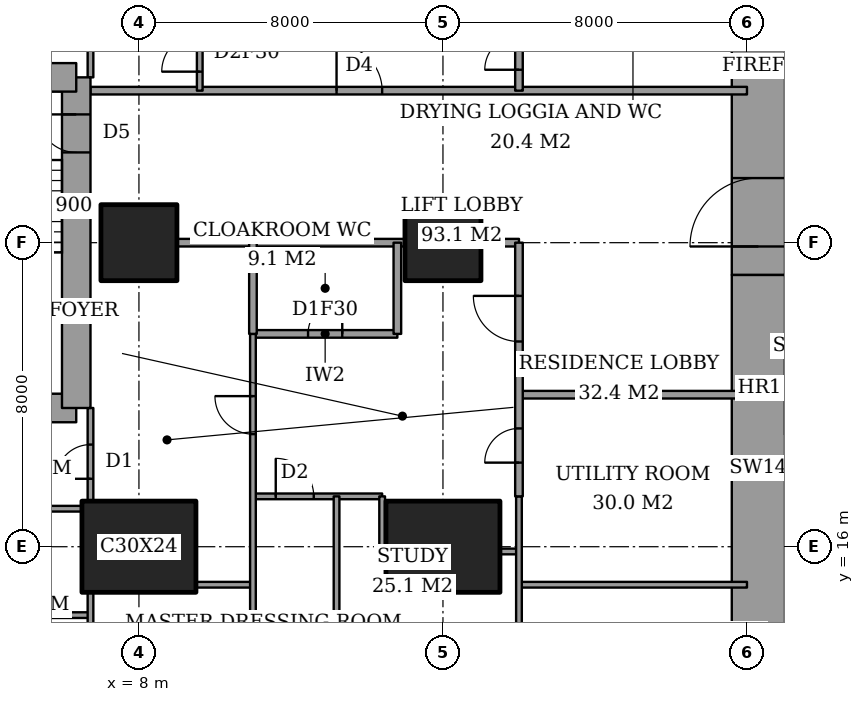
"""IFC4 building model, lengths in metres.
Left out: names, types, materials, properties, quantities, classifications, styles, units other than length and angle.
Written with IfcOpenShell. Run it as: python <this file> out.ifc"""

import sys

from ifc_helpers import new_model, si_unit, direction, frame, frame_2d, origin, origin_2d, place, context, subcontext, project, spatial, rectangle, extrude, element, fill, save


model = new_model("IFC4")
c1 = context("Model", 3, precision=1e-05, world=origin(), true_north=direction((0.0, 1.0)))
c2 = subcontext(c1, "Body", "Model", "MODEL_VIEW")
j1 = project(units=[si_unit("LENGTHUNIT", "METRE"), si_unit("PLANEANGLEUNIT", "RADIAN")], contexts=[c1])
p1 = place(None, origin())
s1 = spatial("IfcSite", under=j1, at=p1, CompositionType="ELEMENT")
p2 = place(p1, origin())
s2 = spatial("IfcBuilding", under=s1, at=p2, CompositionType="ELEMENT")
p3 = place(p2, frame((0.0, 0.0, 76.4)))
s3 = spatial("IfcBuildingStorey", under=s2, at=p3, CompositionType="ELEMENT", Elevation=76.4)
p4 = place(p3, frame((8.0, 16.0, 0.0), z_axis=(0.0, 0.0, 1.0), x_axis=(1.0, 0.0, 0.0)))
e1 = element("IfcColumn", 1, at=p4, inside=s3, PredefinedType="COLUMN", context=c2, shape_type="SweptSolid", body=[
    extrude(rectangle(XDim=3.0, YDim=2.4, at=origin_2d()), origin(), (0.0, 0.0, 1.0), 3.6),
])
p5 = place(p3, frame((8.0, 24.0, 0.0), z_axis=(0.0, 0.0, 1.0), x_axis=(1.0, 0.0, 0.0)))
e2 = element("IfcColumn", 2, at=p5, inside=s3, PredefinedType="COLUMN", context=c2, shape_type="SweptSolid", body=[
    extrude(rectangle(XDim=2.0, YDim=2.0, at=origin_2d()), origin(), (0.0, 0.0, 1.0), 3.6),
])
p6 = place(p3, frame((16.0, 16.0, 0.0), z_axis=(0.0, 0.0, 1.0), x_axis=(1.0, 0.0, 0.0)))
e3 = element("IfcColumn", 3, at=p6, inside=s3, PredefinedType="COLUMN", context=c2, shape_type="SweptSolid", body=[
    extrude(rectangle(XDim=3.0, YDim=2.4, at=origin_2d()), origin(), (0.0, 0.0, 1.0), 3.6),
])
p7 = place(p3, frame((16.0, 24.0, 0.0), z_axis=(0.0, 0.0, 1.0), x_axis=(1.0, 0.0, 0.0)))
e4 = element("IfcColumn", 4, at=p7, inside=s3, PredefinedType="COLUMN", context=c2, shape_type="SweptSolid", body=[
    extrude(rectangle(XDim=2.0, YDim=2.0, at=origin_2d()), origin(), (0.0, 0.0, 1.0), 3.6),
])
p8 = place(p3, frame((24.3, 13.0, 0.0), z_axis=(0.0, 0.0, 1.0), x_axis=(0.0, 1.0, 0.0)))
e5 = element("IfcWall", 5, at=p8, inside=s3, PredefinedType="SHEAR", context=c2, shape_type="SweptSolid", body=[
    extrude(rectangle(XDim=10.15, YDim=1.4, at=frame_2d((5.075, 0.0))), origin(), (0.0, 0.0, 1.0), 3.6),
])
p9 = place(p3, frame((24.3, 23.15, 0.0), z_axis=(0.0, 0.0, 1.0), x_axis=(0.0, 1.0, 0.0)))
e6 = element("IfcWall", 6, at=p9, inside=s3, PredefinedType="SHEAR", context=c2, shape_type="SweptSolid", body=[
    extrude(rectangle(XDim=11.85, YDim=1.4, at=frame_2d((5.925, 0.0))), origin(), (0.0, 0.0, 1.0), 3.6),
])
p10 = place(p9, frame((0.75, 0.0, 0.0)))
e7 = element("IfcOpeningElement", 7, at=p10, cuts=e6, PredefinedType="OPENING", context=c2, shape_type="SweptSolid", body=[
    extrude(rectangle(XDim=1.8, YDim=2.4, at=frame_2d((0.9, 1.2))), frame((0.0, 0.71, 0.0), z_axis=(0.0, -1.0, 0.0), x_axis=(1.0, 0.0, 0.0)), (0.0, 0.0, 1.0), 1.42),
])
p11 = place(p3, frame((1.9, 19.65, 0.0), z_axis=(0.0, 0.0, 1.0), x_axis=(1.0, 0.0, 0.0)))
e8 = element("IfcWall", 8, at=p11, inside=s3, PredefinedType="SHEAR", context=c2, shape_type="SweptSolid", body=[
    extrude(rectangle(XDim=4.45, YDim=0.75, at=frame_2d((2.225, 0.0))), origin(), (0.0, 0.0, 1.0), 3.6),
])
p12 = place(p3, frame((6.35, 19.65, 0.0), z_axis=(0.0, 0.0, 1.0), x_axis=(0.0, 1.0, 0.0)))
e9 = element("IfcWall", 9, at=p12, inside=s3, PredefinedType="SHEAR", context=c2, shape_type="SweptSolid", body=[
    extrude(rectangle(XDim=8.7, YDim=0.75, at=frame_2d((4.35, 0.0))), origin(), (0.0, 0.0, 1.0), 3.6),
])
p13 = place(p12, frame((6.725, 0.0, 0.0)))
e10 = element("IfcOpeningElement", 10, at=p13, cuts=e9, PredefinedType="OPENING", context=c2, shape_type="SweptSolid", body=[
    extrude(rectangle(XDim=1.0, YDim=2.1, at=frame_2d((0.5, 1.05))), frame((0.0, 0.385, 0.0), z_axis=(0.0, -1.0, 0.0), x_axis=(1.0, 0.0, 0.0)), (0.0, 0.0, 1.0), 0.77),
])
p14 = place(p3, frame((6.35, 28.35, 0.0), z_axis=(0.0, 0.0, 1.0), x_axis=(-1.0, 0.0, 0.0)))
e11 = element("IfcWall", 11, at=p14, inside=s3, PredefinedType="SHEAR", context=c2, shape_type="SweptSolid", body=[
    extrude(rectangle(XDim=4.45, YDim=0.75, at=frame_2d((2.225, 0.0))), origin(), (0.0, 0.0, 1.0), 3.6),
])
p15 = place(p3, frame((4.125, 14.2, 0.0), z_axis=(0.0, 0.0, 1.0), x_axis=(1.0, 0.0, 0.0)))
e12 = element("IfcWall", 12, at=p15, inside=s3, PredefinedType="PARTITIONING", context=c2, shape_type="SweptSolid", body=[
    extrude(rectangle(XDim=2.6, YDim=0.15, at=frame_2d((1.3, 0.0))), origin(), (0.0, 0.0, 1.0), 3.35),
])
p16 = place(p3, frame((9.5, 15.0, 0.0), z_axis=(0.0, 0.0, 1.0), x_axis=(1.0, 0.0, 0.0)))
e13 = element("IfcWall", 13, at=p16, inside=s3, PredefinedType="PARTITIONING", context=c2, shape_type="SweptSolid", body=[
    extrude(rectangle(XDim=1.5, YDim=0.15, at=frame_2d((0.75, 0.0))), origin(), (0.0, 0.0, 1.0), 3.35),
])
p17 = place(p3, frame((18.0, 15.0, 0.0), z_axis=(0.0, 0.0, 1.0), x_axis=(1.0, 0.0, 0.0)))
e14 = element("IfcWall", 14, at=p17, inside=s3, PredefinedType="PARTITIONING", context=c2, shape_type="SweptSolid", body=[
    extrude(rectangle(XDim=6.0, YDim=0.15, at=frame_2d((3.0, 0.0))), origin(), (0.0, 0.0, 1.0), 3.35),
])
p18 = place(p3, frame((17.5, 15.875, 0.0), z_axis=(0.0, 0.0, 1.0), x_axis=(1.0, 0.0, 0.0)))
e15 = element("IfcWall", 15, at=p18, inside=s3, PredefinedType="PARTITIONING", context=c2, shape_type="SweptSolid", body=[
    extrude(rectangle(XDim=0.5, YDim=0.15, at=frame_2d((0.25, 0.0))), origin(), (0.0, 0.0, 1.0), 2.634),
])
p19 = place(p3, frame((1.35, 17.0, 0.0), z_axis=(0.0, 0.0, 1.0), x_axis=(1.0, 0.0, 0.0)))
e16 = element("IfcWall", 16, at=p19, inside=s3, PredefinedType="PARTITIONING", context=c2, shape_type="SweptSolid", body=[
    extrude(rectangle(XDim=5.15, YDim=0.15, at=frame_2d((2.575, 0.0))), origin(), (0.0, 0.0, 1.0), 3.35),
])
p20 = place(p3, frame((11.0, 17.325, 0.0), z_axis=(0.0, 0.0, 1.0), x_axis=(1.0, 0.0, 0.0)))
e17 = element("IfcWall", 17, at=p20, inside=s3, PredefinedType="PARTITIONING", context=c2, shape_type="SweptSolid", body=[
    extrude(rectangle(XDim=3.4, YDim=0.15, at=frame_2d((1.7, 0.0))), origin(), (0.0, 0.0, 1.0), 3.35),
])
p21 = place(p20, frame((0.6, 0.0, 0.0)))
e18 = element("IfcOpeningElement", 18, at=p21, cuts=e17, PredefinedType="OPENING", context=c2, shape_type="SweptSolid", body=[
    extrude(rectangle(XDim=1.0, YDim=2.1, at=frame_2d((0.5, 1.05))), frame((0.0, 0.085, 0.0), z_axis=(0.0, -1.0, 0.0), x_axis=(1.0, 0.0, 0.0)), (0.0, 0.0, 1.0), 0.17),
])
p22 = place(p3, frame((18.0, 20.0, 0.0), z_axis=(0.0, 0.0, 1.0), x_axis=(1.0, 0.0, 0.0)))
e19 = element("IfcWall", 19, at=p22, inside=s3, PredefinedType="PARTITIONING", context=c2, shape_type="SweptSolid", body=[
    extrude(rectangle(XDim=6.0, YDim=0.2, at=frame_2d((3.0, 0.0))), origin(), (0.0, 0.0, 1.0), 3.35),
])
p23 = place(p3, frame((11.0, 21.6, 0.0), z_axis=(0.0, 0.0, 1.0), x_axis=(1.0, 0.0, 0.0)))
e20 = element("IfcWall", 20, at=p23, inside=s3, PredefinedType="PARTITIONING", context=c2, shape_type="SweptSolid", body=[
    extrude(rectangle(XDim=3.8, YDim=0.2, at=frame_2d((1.9, 0.0))), origin(), (0.0, 0.0, 1.0), 3.35),
])
p24 = place(p23, frame((1.45, 0.0, 0.0)))
e21 = element("IfcOpeningElement", 21, at=p24, cuts=e20, PredefinedType="OPENING", context=c2, shape_type="SweptSolid", body=[
    extrude(rectangle(XDim=0.9, YDim=2.1, at=frame_2d((0.45, 1.05))), frame((0.0, 0.11, 0.0), z_axis=(0.0, -1.0, 0.0), x_axis=(1.0, 0.0, 0.0)), (0.0, 0.0, 1.0), 0.22),
])
p25 = place(p3, frame((9.0, 24.0, 0.0), z_axis=(0.0, 0.0, 1.0), x_axis=(1.0, 0.0, 0.0)))
e22 = element("IfcWall", 22, at=p25, inside=s3, PredefinedType="PARTITIONING", context=c2, shape_type="SweptSolid", body=[
    extrude(rectangle(XDim=6.0, YDim=0.2, at=frame_2d((3.0, 0.0))), origin(), (0.0, 0.0, 1.0), 3.35),
])
p26 = place(p3, frame((17.0, 24.0, 0.0), z_axis=(0.0, 0.0, 1.0), x_axis=(1.0, 0.0, 0.0)))
e23 = element("IfcWall", 23, at=p26, inside=s3, PredefinedType="PARTITIONING", context=c2, shape_type="SweptSolid", body=[
    extrude(rectangle(XDim=1.0, YDim=0.2, at=frame_2d((0.5, 0.0))), origin(), (0.0, 0.0, 1.0), 3.35),
])
p27 = place(p3, frame((6.725, 28.0, 0.0), z_axis=(0.0, 0.0, 1.0), x_axis=(1.0, 0.0, 0.0)))
e24 = element("IfcWall", 24, at=p27, inside=s3, PredefinedType="PARTITIONING", context=c2, shape_type="SweptSolid", body=[
    extrude(rectangle(XDim=17.275, YDim=0.2, at=frame_2d((8.637, 0.0))), origin(), (0.0, 0.0, 1.0), 3.35),
])
p28 = place(p27, frame((6.475, 0.0, 0.0)))
e25 = element("IfcOpeningElement", 25, at=p28, cuts=e24, PredefinedType="OPENING", context=c2, shape_type="SweptSolid", body=[
    extrude(rectangle(XDim=1.2, YDim=2.4, at=frame_2d((0.6, 1.2))), frame((0.0, 0.11, 0.0), z_axis=(0.0, -1.0, 0.0), x_axis=(1.0, 0.0, 0.0)), (0.0, 0.0, 1.0), 0.22),
])
p29 = place(p3, frame((6.725, 11.0, 0.0), z_axis=(0.0, 0.0, 1.0), x_axis=(0.0, 1.0, 0.0)))
e26 = element("IfcWall", 26, at=p29, inside=s3, PredefinedType="PARTITIONING", context=c2, shape_type="SweptSolid", body=[
    extrude(rectangle(XDim=3.8, YDim=0.15, at=frame_2d((1.9, 0.0))), origin(), (0.0, 0.0, 1.0), 3.35),
])
p30 = place(p29, frame((1.15, 0.0, 0.0)))
e27 = element("IfcOpeningElement", 27, at=p30, cuts=e26, PredefinedType="OPENING", context=c2, shape_type="SweptSolid", body=[
    extrude(rectangle(XDim=0.9, YDim=2.1, at=frame_2d((0.45, 1.05))), frame((0.0, 0.085, 0.0), z_axis=(0.0, -1.0, 0.0), x_axis=(1.0, 0.0, 0.0)), (0.0, 0.0, 1.0), 0.17),
])
p31 = place(p3, frame((6.725, 17.2, 0.0), z_axis=(0.0, 0.0, 1.0), x_axis=(0.0, 1.0, 0.0)))
e28 = element("IfcWall", 28, at=p31, inside=s3, PredefinedType="PARTITIONING", context=c2, shape_type="SweptSolid", body=[
    extrude(rectangle(XDim=2.45, YDim=0.15, at=frame_2d((1.225, 0.0))), origin(), (0.0, 0.0, 1.0), 3.35),
])
p32 = place(p31, frame((0.587, 0.0, 0.0)))
e29 = element("IfcOpeningElement", 29, at=p32, cuts=e28, PredefinedType="OPENING", context=c2, shape_type="SweptSolid", body=[
    extrude(rectangle(XDim=0.9, YDim=2.1, at=frame_2d((0.45, 1.05))), frame((0.0, 0.085, 0.0), z_axis=(0.0, -1.0, 0.0), x_axis=(1.0, 0.0, 0.0)), (0.0, 0.0, 1.0), 0.17),
])
p33 = place(p3, frame((6.725, 28.35, 0.0), z_axis=(0.0, 0.0, 1.0), x_axis=(0.0, 1.0, 0.0)))
e30 = element("IfcWall", 30, at=p33, inside=s3, PredefinedType="PARTITIONING", context=c2, shape_type="SweptSolid", body=[
    extrude(rectangle(XDim=2.45, YDim=0.15, at=frame_2d((1.225, 0.0))), origin(), (0.0, 0.0, 1.0), 3.35),
])
p34 = place(p33, frame((0.913, 0.0, 0.0)))
e31 = element("IfcOpeningElement", 31, at=p34, cuts=e30, PredefinedType="OPENING", context=c2, shape_type="SweptSolid", body=[
    extrude(rectangle(XDim=1.0, YDim=2.1, at=frame_2d((0.5, 1.05))), frame((0.0, 0.085, 0.0), z_axis=(0.0, -1.0, 0.0), x_axis=(1.0, 0.0, 0.0)), (0.0, 0.0, 1.0), 0.17),
])
p35 = place(p3, frame((9.6, 28.0, 0.0), z_axis=(0.0, 0.0, 1.0), x_axis=(0.0, 1.0, 0.0)))
e32 = element("IfcWall", 32, at=p35, inside=s3, PredefinedType="PARTITIONING", context=c2, shape_type="SweptSolid", body=[
    extrude(rectangle(XDim=9.4, YDim=0.15, at=frame_2d((4.7, 0.0))), origin(), (0.0, 0.0, 1.0), 3.35),
])
p36 = place(p35, frame((0.5, 0.0, 0.0)))
e33 = element("IfcOpeningElement", 33, at=p36, cuts=e32, PredefinedType="OPENING", context=c2, shape_type="SweptSolid", body=[
    extrude(rectangle(XDim=1.0, YDim=2.1, at=frame_2d((0.5, 1.05))), frame((0.0, 0.085, 0.0), z_axis=(0.0, -1.0, 0.0), x_axis=(1.0, 0.0, 0.0)), (0.0, 0.0, 1.0), 0.17),
])
p37 = place(p3, frame((11.0, 21.6, 0.0), z_axis=(0.0, 0.0, 1.0), x_axis=(0.0, 1.0, 0.0)))
e34 = element("IfcWall", 34, at=p37, inside=s3, PredefinedType="PARTITIONING", context=c2, shape_type="SweptSolid", body=[
    extrude(rectangle(XDim=2.4, YDim=0.2, at=frame_2d((1.2, 0.0))), origin(), (0.0, 0.0, 1.0), 3.35),
])
p38 = place(p3, frame((11.0, 11.0, 0.0), z_axis=(0.0, 0.0, 1.0), x_axis=(0.0, 1.0, 0.0)))
e35 = element("IfcWall", 35, at=p38, inside=s3, PredefinedType="PARTITIONING", context=c2, shape_type="SweptSolid", body=[
    extrude(rectangle(XDim=10.6, YDim=0.15, at=frame_2d((5.3, 0.0))), origin(), (0.0, 0.0, 1.0), 3.35),
])
p39 = place(p38, frame((7.962, 0.0, 0.0)))
e36 = element("IfcOpeningElement", 36, at=p39, cuts=e35, PredefinedType="OPENING", context=c2, shape_type="SweptSolid", body=[
    extrude(rectangle(XDim=1.0, YDim=2.1, at=frame_2d((0.5, 1.05))), frame((0.0, 0.085, 0.0), z_axis=(0.0, -1.0, 0.0), x_axis=(1.0, 0.0, 0.0)), (0.0, 0.0, 1.0), 0.17),
])
p40 = place(p3, frame((13.2, 11.0, 0.0), z_axis=(0.0, 0.0, 1.0), x_axis=(0.0, 1.0, 0.0)))
e37 = element("IfcWall", 37, at=p40, inside=s3, PredefinedType="PARTITIONING", context=c2, shape_type="SweptSolid", body=[
    extrude(rectangle(XDim=6.325, YDim=0.15, at=frame_2d((3.163, 0.0))), origin(), (0.0, 0.0, 1.0), 3.35),
])
p41 = place(p3, frame((14.4, 15.875, 0.0), z_axis=(0.0, 0.0, 1.0), x_axis=(0.0, 1.0, 0.0)))
e38 = element("IfcWall", 38, at=p41, inside=s3, PredefinedType="PARTITIONING", context=c2, shape_type="SweptSolid", body=[
    extrude(rectangle(XDim=1.45, YDim=0.15, at=frame_2d((0.725, 0.0))), origin(), (0.0, 0.0, 1.0), 3.35),
])
p42 = place(p3, frame((14.8, 21.6, 0.0), z_axis=(0.0, 0.0, 1.0), x_axis=(0.0, 1.0, 0.0)))
e39 = element("IfcWall", 39, at=p42, inside=s3, PredefinedType="PARTITIONING", context=c2, shape_type="SweptSolid", body=[
    extrude(rectangle(XDim=2.4, YDim=0.2, at=frame_2d((1.2, 0.0))), origin(), (0.0, 0.0, 1.0), 3.35),
])
p43 = place(p3, frame((18.0, 17.325, 0.0), z_axis=(0.0, 0.0, 1.0), x_axis=(0.0, 1.0, 0.0)))
e40 = element("IfcWall", 40, at=p43, inside=s3, PredefinedType="PARTITIONING", context=c2, shape_type="SweptSolid", body=[
    extrude(rectangle(XDim=6.675, YDim=0.2, at=frame_2d((3.337, 0.0))), origin(), (0.0, 0.0, 1.0), 3.35),
])
p44 = place(p43, frame((4.075, 0.0, 0.0)))
e41 = element("IfcOpeningElement", 41, at=p44, cuts=e40, PredefinedType="OPENING", context=c2, shape_type="SweptSolid", body=[
    extrude(rectangle(XDim=1.2, YDim=2.4, at=frame_2d((0.6, 1.2))), frame((0.0, 0.11, 0.0), z_axis=(0.0, -1.0, 0.0), x_axis=(1.0, 0.0, 0.0)), (0.0, 0.0, 1.0), 0.22),
])
p45 = place(p43, frame((0.887, 0.0, 0.0)))
e42 = element("IfcOpeningElement", 42, at=p45, cuts=e40, PredefinedType="OPENING", context=c2, shape_type="SweptSolid", body=[
    extrude(rectangle(XDim=0.9, YDim=2.1, at=frame_2d((0.45, 1.05))), frame((0.0, 0.11, 0.0), z_axis=(0.0, -1.0, 0.0), x_axis=(1.0, 0.0, 0.0)), (0.0, 0.0, 1.0), 0.22),
])
p46 = place(p3, frame((18.0, 28.0, 0.0), z_axis=(0.0, 0.0, 1.0), x_axis=(0.0, 1.0, 0.0)))
e43 = element("IfcWall", 43, at=p46, inside=s3, PredefinedType="PARTITIONING", context=c2, shape_type="SweptSolid", body=[
    extrude(rectangle(XDim=3.4, YDim=0.2, at=frame_2d((1.7, 0.0))), origin(), (0.0, 0.0, 1.0), 3.35),
])
p47 = place(p46, frame((0.55, 0.0, 0.0)))
e44 = element("IfcOpeningElement", 44, at=p47, cuts=e43, PredefinedType="OPENING", context=c2, shape_type="SweptSolid", body=[
    extrude(rectangle(XDim=0.9, YDim=2.1, at=frame_2d((0.45, 1.05))), frame((0.0, 0.11, 0.0), z_axis=(0.0, -1.0, 0.0), x_axis=(1.0, 0.0, 0.0)), (0.0, 0.0, 1.0), 0.22),
])
p48 = place(p3, frame((18.0, 11.0, 0.0), z_axis=(0.0, 0.0, 1.0), x_axis=(0.0, 1.0, 0.0)))
e45 = element("IfcWall", 45, at=p48, inside=s3, PredefinedType="PARTITIONING", context=c2, shape_type="SweptSolid", body=[
    extrude(rectangle(XDim=6.325, YDim=0.15, at=frame_2d((3.163, 0.0))), origin(), (0.0, 0.0, 1.0), 3.35),
])
p49 = place(p32, origin())
e46 = element("IfcDoor", 46, at=p49, inside=s3, OperationType="SINGLE_SWING_RIGHT", PredefinedType="DOOR", context=c2, shape_type="SweptSolid", body=[
    extrude(rectangle(XDim=0.9, YDim=2.1, at=frame_2d((0.45, 1.05))), frame((0.0, 0.025, 0.0), z_axis=(0.0, -1.0, 0.0), x_axis=(1.0, 0.0, 0.0)), (0.0, 0.0, 1.0), 0.05),
])
fill(e29, e46)
p50 = place(p39, origin())
e47 = element("IfcDoor", 47, at=p50, inside=s3, OperationType="SINGLE_SWING_LEFT", PredefinedType="DOOR", context=c2, shape_type="SweptSolid", body=[
    extrude(rectangle(XDim=1.0, YDim=2.1, at=frame_2d((0.5, 1.05))), frame((0.0, 0.025, 0.0), z_axis=(0.0, -1.0, 0.0), x_axis=(1.0, 0.0, 0.0)), (0.0, 0.0, 1.0), 0.05),
])
fill(e36, e47)
p51 = place(p24, origin())
e48 = element("IfcDoor", 48, at=p51, inside=s3, OperationType="SINGLE_SWING_LEFT", PredefinedType="DOOR", context=c2, shape_type="SweptSolid", body=[
    extrude(rectangle(XDim=0.9, YDim=2.1, at=frame_2d((0.45, 1.05))), frame((0.0, 0.025, 0.0), z_axis=(0.0, -1.0, 0.0), x_axis=(1.0, 0.0, 0.0)), (0.0, 0.0, 1.0), 0.05),
])
fill(e21, e48)
p52 = place(p44, origin())
e49 = element("IfcDoor", 49, at=p52, inside=s3, OperationType="SINGLE_SWING_LEFT", PredefinedType="DOOR", context=c2, shape_type="SweptSolid", body=[
    extrude(rectangle(XDim=1.2, YDim=2.4, at=frame_2d((0.6, 1.2))), frame((0.0, 0.025, 0.0), z_axis=(0.0, -1.0, 0.0), x_axis=(1.0, 0.0, 0.0)), (0.0, 0.0, 1.0), 0.05),
])
fill(e41, e49)
p53 = place(p21, origin())
e50 = element("IfcDoor", 50, at=p53, inside=s3, OperationType="SINGLE_SWING_RIGHT", PredefinedType="DOOR", context=c2, shape_type="SweptSolid", body=[
    extrude(rectangle(XDim=1.0, YDim=2.1, at=frame_2d((0.5, 1.05))), frame((0.0, 0.025, 0.0), z_axis=(0.0, -1.0, 0.0), x_axis=(1.0, 0.0, 0.0)), (0.0, 0.0, 1.0), 0.05),
])
fill(e18, e50)
p54 = place(p45, origin())
e51 = element("IfcDoor", 51, at=p54, inside=s3, OperationType="SINGLE_SWING_RIGHT", PredefinedType="DOOR", context=c2, shape_type="SweptSolid", body=[
    extrude(rectangle(XDim=0.9, YDim=2.1, at=frame_2d((0.45, 1.05))), frame((0.0, 0.025, 0.0), z_axis=(0.0, -1.0, 0.0), x_axis=(1.0, 0.0, 0.0)), (0.0, 0.0, 1.0), 0.05),
])
fill(e42, e51)
p55 = place(p36, origin())
e52 = element("IfcDoor", 52, at=p55, inside=s3, OperationType="SINGLE_SWING_RIGHT", PredefinedType="DOOR", context=c2, shape_type="SweptSolid", body=[
    extrude(rectangle(XDim=1.0, YDim=2.1, at=frame_2d((0.5, 1.05))), frame((0.0, 0.025, 0.0), z_axis=(0.0, -1.0, 0.0), x_axis=(1.0, 0.0, 0.0)), (0.0, 0.0, 1.0), 0.05),
])
fill(e33, e52)
p56 = place(p28, origin())
e53 = element("IfcDoor", 53, at=p56, inside=s3, OperationType="SINGLE_SWING_RIGHT", PredefinedType="DOOR", context=c2, shape_type="SweptSolid", body=[
    extrude(rectangle(XDim=1.2, YDim=2.4, at=frame_2d((0.6, 1.2))), frame((0.0, 0.025, 0.0), z_axis=(0.0, -1.0, 0.0), x_axis=(1.0, 0.0, 0.0)), (0.0, 0.0, 1.0), 0.05),
])
fill(e25, e53)
p57 = place(p47, origin())
e54 = element("IfcDoor", 54, at=p57, inside=s3, OperationType="SINGLE_SWING_RIGHT", PredefinedType="DOOR", context=c2, shape_type="SweptSolid", body=[
    extrude(rectangle(XDim=0.9, YDim=2.1, at=frame_2d((0.45, 1.05))), frame((0.0, 0.025, 0.0), z_axis=(0.0, -1.0, 0.0), x_axis=(1.0, 0.0, 0.0)), (0.0, 0.0, 1.0), 0.05),
])
fill(e44, e54)
p58 = place(p10, origin())
e55 = element("IfcDoor", 55, at=p58, inside=s3, OperationType="DOUBLE_DOOR_DOUBLE_SWING", PredefinedType="DOOR", context=c2, shape_type="SweptSolid", body=[
    extrude(rectangle(XDim=1.8, YDim=2.4, at=frame_2d((0.9, 1.2))), frame((0.0, 0.025, 0.0), z_axis=(0.0, -1.0, 0.0), x_axis=(1.0, 0.0, 0.0)), (0.0, 0.0, 1.0), 0.05),
])
fill(e7, e55)
p59 = place(p13, origin())
e56 = element("IfcDoor", 56, at=p59, inside=s3, OperationType="SINGLE_SWING_LEFT", PredefinedType="DOOR", context=c2, shape_type="SweptSolid", body=[
    extrude(rectangle(XDim=1.0, YDim=2.1, at=frame_2d((0.5, 1.05))), frame((0.0, 0.025, 0.0), z_axis=(0.0, -1.0, 0.0), x_axis=(1.0, 0.0, 0.0)), (0.0, 0.0, 1.0), 0.05),
])
fill(e10, e56)
save(model, sys.argv[1])
